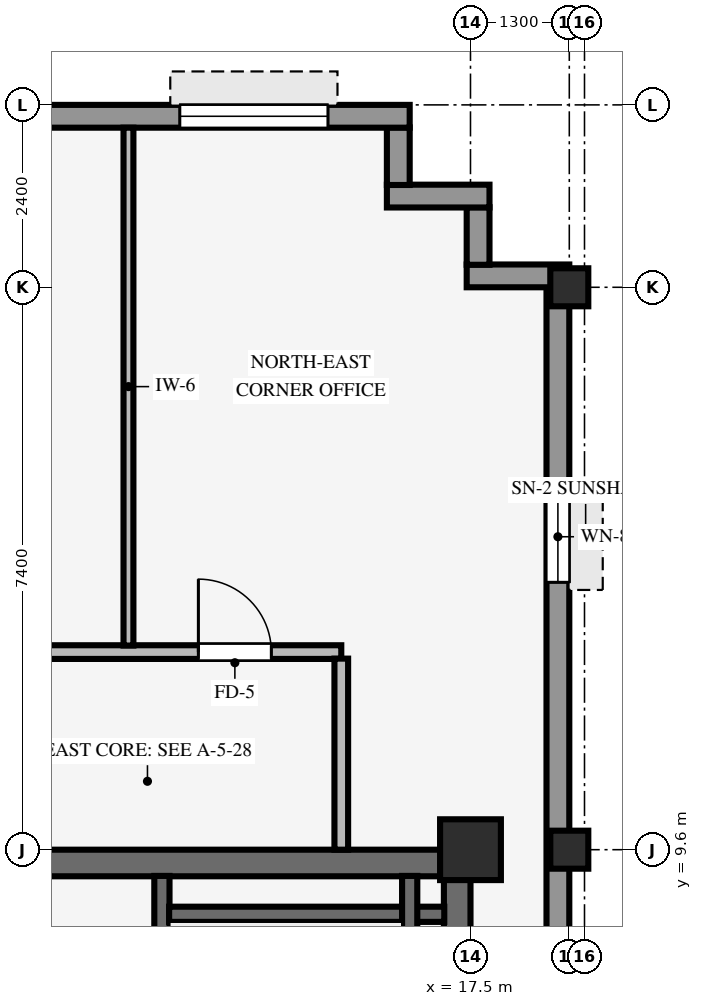
"""IFC4 building model, lengths in metres.
Left out: names, types, materials, properties, quantities, classifications, styles, units other than length and angle.
Written with IfcOpenShell. Run it as: python <this file> out.ifc"""

import sys

from ifc_helpers import new_model, si_unit, direction, frame, frame_2d, origin, origin_2d, place, context, subcontext, project, spatial, rectangle, hollow_rectangle, extrude, source, transform, mapped, element, fill, save


model = new_model("IFC4")
c1 = context("Model", 3, precision=1e-05, world=origin(), true_north=direction((0.0, 1.0)))
c2 = subcontext(c1, "Body", "Model", "MODEL_VIEW")
j1 = project(units=[si_unit("LENGTHUNIT", "METRE"), si_unit("PLANEANGLEUNIT", "RADIAN")], contexts=[c1])
p1 = place(None, origin())
s1 = spatial("IfcSite", under=j1, at=p1, CompositionType="ELEMENT")
p2 = place(p1, origin())
s2 = spatial("IfcBuilding", under=s1, at=p2, CompositionType="ELEMENT")
p3 = place(p2, frame((0.0, 0.0, 257.95)))
s3 = spatial("IfcBuildingStorey", under=s2, at=p3, CompositionType="ELEMENT", Elevation=257.95)
p4 = place(p3, frame((9.0, 9.425, 0.0), z_axis=(0.0, 0.0, 1.0), x_axis=(1.0, 0.0, 0.0)))
e1 = element("IfcWall", 1, at=p4, inside=s3, PredefinedType="SHEAR", context=c2, shape_type="SweptSolid", body=[
    extrude(rectangle(XDim=8.5, YDim=0.35, at=frame_2d((4.25, 0.0))), origin(), (0.0, 0.0, 1.0), 3.37),
])
p5 = place(p3, frame((17.325, -9.255, 0.0), z_axis=(0.0, 0.0, 1.0), x_axis=(0.0, 1.0, 0.0)))
e2 = element("IfcWall", 2, at=p5, inside=s3, PredefinedType="SHEAR", context=c2, shape_type="SweptSolid", body=[
    extrude(rectangle(XDim=18.51, YDim=0.35, at=frame_2d((9.255, 0.0))), origin(), (0.0, 0.0, 1.0), 3.37),
])
p6 = place(p3, frame((17.5, 9.6, 0.0), z_axis=(0.0, 0.0, 1.0), x_axis=(1.0, 0.0, 0.0)))
e3 = element("IfcColumn", 3, at=p6, inside=s3, PredefinedType="COLUMN", context=c2, shape_type="SweptSolid", body=[
    extrude(rectangle(XDim=0.8, YDim=0.8, at=origin_2d()), origin(), (0.0, 0.0, 1.0), 3.37),
])
for number, where, z_axis, x_axis in (
    (4, (18.8, 9.6, 0.0), (0.0, 0.0, 1.0), (1.0, 0.0, 0.0)),
    (5, (18.8, 17.0, 0.0), (0.0, 0.0, 1.0), (1.0, 0.0, 0.0)),
):
    element("IfcColumn", number, at=place(p3, frame(where, z_axis=z_axis, x_axis=x_axis)), inside=s3, PredefinedType="COLUMN", context=c2, shape_type="SweptSolid", body=[
        extrude(hollow_rectangle(XDim=0.5, YDim=0.5, WallThickness=0.032, InnerFilletRadius=0.032, OuterFilletRadius=0.064, at=origin_2d()), origin(), (0.0, 0.0, 1.0), 3.37),
    ])
p7 = place(p3, frame((18.65, -17.004, 0.0), z_axis=(0.0, 0.0, 1.0), x_axis=(0.0, 1.0, 0.0)))
e6 = element("IfcWall", 6, at=p7, inside=s3, PredefinedType="STANDARD", context=c2, shape_type="SweptSolid", body=[
    extrude(rectangle(XDim=34.008, YDim=0.3, at=frame_2d((17.004, 0.0))), origin(), (0.0, 0.0, 1.0), 2.705),
])
p8 = place(p7, frame((2.686, 0.0, 0.8)))
e7 = element("IfcOpeningElement", 7, at=p8, cuts=e6, PredefinedType="OPENING", context=c2, shape_type="SweptSolid", body=[
    extrude(rectangle(XDim=1.2, YDim=1.48, at=frame_2d((0.6, 0.74))), frame((0.0, 0.16, 0.0), z_axis=(0.0, -1.0, 0.0), x_axis=(1.0, 0.0, 0.0)), (0.0, 0.0, 1.0), 0.32),
])
p9 = place(p7, frame((30.122, 0.0, 0.8)))
e8 = element("IfcOpeningElement", 8, at=p9, cuts=e6, PredefinedType="OPENING", context=c2, shape_type="SweptSolid", body=[
    extrude(rectangle(XDim=1.2, YDim=1.48, at=frame_2d((0.6, 0.74))), frame((0.0, 0.16, 0.0), z_axis=(0.0, -1.0, 0.0), x_axis=(1.0, 0.0, 0.0)), (0.0, 0.0, 1.0), 0.32),
])
p10 = place(p3, frame((17.45, 17.15, 0.0), z_axis=(0.0, 0.0, 1.0), x_axis=(1.0, 0.0, 0.0)))
e9 = element("IfcWall", 9, at=p10, inside=s3, PredefinedType="STANDARD", context=c2, shape_type="SweptSolid", body=[
    extrude(rectangle(XDim=1.35, YDim=0.3, at=frame_2d((0.675, 0.0))), origin(), (0.0, 0.0, 1.0), 2.892),
])
p11 = place(p3, frame((17.6, 17.296, 0.0), z_axis=(0.0, 0.0, 1.0), x_axis=(0.0, 1.0, 0.0)))
e10 = element("IfcWall", 10, at=p11, inside=s3, PredefinedType="STANDARD", context=c2, shape_type="SweptSolid", body=[
    extrude(rectangle(XDim=0.758, YDim=0.3, at=frame_2d((0.379, 0.0))), origin(), (0.0, 0.0, 1.0), 2.892),
])
p12 = place(p3, frame((16.4, 18.2, 0.0), z_axis=(0.0, 0.0, 1.0), x_axis=(1.0, 0.0, 0.0)))
e11 = element("IfcWall", 11, at=p12, inside=s3, PredefinedType="STANDARD", context=c2, shape_type="SweptSolid", body=[
    extrude(rectangle(XDim=1.35, YDim=0.3, at=frame_2d((0.675, 0.0))), origin(), (0.0, 0.0, 1.0), 2.892),
])
p13 = place(p3, frame((16.55, 18.346, 0.0), z_axis=(0.0, 0.0, 1.0), x_axis=(0.0, 1.0, 0.0)))
e12 = element("IfcWall", 12, at=p13, inside=s3, PredefinedType="STANDARD", context=c2, shape_type="SweptSolid", body=[
    extrude(rectangle(XDim=0.758, YDim=0.3, at=frame_2d((0.379, 0.0))), origin(), (0.0, 0.0, 1.0), 2.892),
])
p14 = place(p3, frame((-18.9, 19.25, 0.0), z_axis=(0.0, 0.0, 1.0), x_axis=(1.0, 0.0, 0.0)))
e13 = element("IfcWall", 13, at=p14, inside=s3, PredefinedType="STANDARD", context=c2, shape_type="SweptSolid", body=[
    extrude(rectangle(XDim=35.6, YDim=0.3, at=frame_2d((17.8, 0.0))), origin(), (0.0, 0.0, 1.0), 2.705),
])
p15 = place(p14, frame((13.6, 0.0, 0.0)))
e14 = element("IfcOpeningElement", 14, at=p15, cuts=e13, PredefinedType="OPENING", context=c2, shape_type="SweptSolid", body=[
    extrude(rectangle(XDim=0.98, YDim=2.15, at=frame_2d((0.49, 1.075))), frame((0.0, 0.16, 0.0), z_axis=(0.0, -1.0, 0.0), x_axis=(1.0, 0.0, 0.0)), (0.0, 0.0, 1.0), 0.32),
])
p16 = place(p14, frame((2.425, 0.0, 0.8)))
e15 = element("IfcOpeningElement", 15, at=p16, cuts=e13, PredefinedType="OPENING", context=c2, shape_type="SweptSolid", body=[
    extrude(rectangle(XDim=1.95, YDim=1.48, at=frame_2d((0.975, 0.74))), frame((0.0, 0.16, 0.0), z_axis=(0.0, -1.0, 0.0), x_axis=(1.0, 0.0, 0.0)), (0.0, 0.0, 1.0), 0.32),
])
p17 = place(p14, frame((7.225, 0.0, 0.8)))
e16 = element("IfcOpeningElement", 16, at=p17, cuts=e13, PredefinedType="OPENING", context=c2, shape_type="SweptSolid", body=[
    extrude(rectangle(XDim=1.95, YDim=1.48, at=frame_2d((0.975, 0.74))), frame((0.0, 0.16, 0.0), z_axis=(0.0, -1.0, 0.0), x_axis=(1.0, 0.0, 0.0)), (0.0, 0.0, 1.0), 0.32),
])
p18 = place(p14, frame((15.475, 0.0, 0.8)))
e17 = element("IfcOpeningElement", 17, at=p18, cuts=e13, PredefinedType="OPENING", context=c2, shape_type="SweptSolid", body=[
    extrude(rectangle(XDim=1.95, YDim=1.48, at=frame_2d((0.975, 0.74))), frame((0.0, 0.16, 0.0), z_axis=(0.0, -1.0, 0.0), x_axis=(1.0, 0.0, 0.0)), (0.0, 0.0, 1.0), 0.32),
])
p19 = place(p14, frame((21.625, 0.0, 0.8)))
e18 = element("IfcOpeningElement", 18, at=p19, cuts=e13, PredefinedType="OPENING", context=c2, shape_type="SweptSolid", body=[
    extrude(rectangle(XDim=1.95, YDim=1.48, at=frame_2d((0.975, 0.74))), frame((0.0, 0.16, 0.0), z_axis=(0.0, -1.0, 0.0), x_axis=(1.0, 0.0, 0.0)), (0.0, 0.0, 1.0), 0.32),
])
p20 = place(p14, frame((32.575, 0.0, 0.8)))
e19 = element("IfcOpeningElement", 19, at=p20, cuts=e13, PredefinedType="OPENING", context=c2, shape_type="SweptSolid", body=[
    extrude(rectangle(XDim=1.95, YDim=1.48, at=frame_2d((0.975, 0.74))), frame((0.0, 0.16, 0.0), z_axis=(0.0, -1.0, 0.0), x_axis=(1.0, 0.0, 0.0)), (0.0, 0.0, 1.0), 0.32),
])
p21 = place(p3, frame((13.44, 0.9, 0.0), z_axis=(0.0, 0.0, 1.0), x_axis=(0.0, 1.0, 0.0)))
e20 = element("IfcWall", 20, at=p21, inside=s3, PredefinedType="SHEAR", context=c2, shape_type="SweptSolid", body=[
    extrude(rectangle(XDim=8.355, YDim=0.2, at=frame_2d((4.177, 0.0))), origin(), (0.0, 0.0, 1.0), 3.37),
])
p22 = place(p21, frame((0.43, 0.0, 0.0)))
e21 = element("IfcOpeningElement", 21, at=p22, cuts=e20, PredefinedType="OPENING", context=c2, shape_type="SweptSolid", body=[
    extrude(rectangle(XDim=1.1, YDim=2.15, at=frame_2d((0.55, 1.075))), frame((0.0, 0.11, 0.0), z_axis=(0.0, -1.0, 0.0), x_axis=(1.0, 0.0, 0.0)), (0.0, 0.0, 1.0), 0.22),
])
p23 = place(p3, frame((13.535, 8.75, 0.0), z_axis=(0.0, 0.0, 1.0), x_axis=(1.0, 0.0, 0.0)))
e22 = element("IfcWall", 22, at=p23, inside=s3, PredefinedType="SHEAR", context=c2, shape_type="SweptSolid", body=[
    extrude(rectangle(XDim=3.62, YDim=0.2, at=frame_2d((1.81, 0.0))), origin(), (0.0, 0.0, 1.0), 3.37),
])
p24 = place(p3, frame((16.7, 1.095, 0.0), z_axis=(0.0, 0.0, 1.0), x_axis=(0.0, 1.0, 0.0)))
e23 = element("IfcWall", 23, at=p24, inside=s3, PredefinedType="SHEAR", context=c2, shape_type="SweptSolid", body=[
    extrude(rectangle(XDim=8.16, YDim=0.2, at=frame_2d((4.08, 0.0))), origin(), (0.0, 0.0, 1.0), 3.37),
])
p25 = place(p3, frame((-9.0, 12.2, 0.0), z_axis=(0.0, 0.0, 1.0), x_axis=(1.0, 0.0, 0.0)))
e24 = element("IfcWall", 24, at=p25, inside=s3, PredefinedType="PARTITIONING", context=c2, shape_type="SweptSolid", body=[
    extrude(rectangle(XDim=24.8, YDim=0.18, at=frame_2d((12.4, 0.0))), origin(), (0.0, 0.0, 1.0), 3.36),
])
p26 = place(p25, frame((11.42, 0.0, 0.0)))
e25 = element("IfcOpeningElement", 25, at=p26, cuts=e24, PredefinedType="OPENING", context=c2, shape_type="SweptSolid", body=[
    extrude(rectangle(XDim=0.96, YDim=2.1, at=frame_2d((0.48, 1.05))), frame((0.0, 0.1, 0.0), z_axis=(0.0, -1.0, 0.0), x_axis=(1.0, 0.0, 0.0)), (0.0, 0.0, 1.0), 0.2),
])
p27 = place(p25, frame((4.82, 0.0, 0.0)))
e26 = element("IfcOpeningElement", 26, at=p27, cuts=e24, PredefinedType="OPENING", context=c2, shape_type="SweptSolid", body=[
    extrude(rectangle(XDim=0.96, YDim=2.1, at=frame_2d((0.48, 1.05))), frame((0.0, 0.1, 0.0), z_axis=(0.0, -1.0, 0.0), x_axis=(1.0, 0.0, 0.0)), (0.0, 0.0, 1.0), 0.2),
])
p28 = place(p25, frame((19.52, 0.0, 0.0)))
e27 = element("IfcOpeningElement", 27, at=p28, cuts=e24, PredefinedType="OPENING", context=c2, shape_type="SweptSolid", body=[
    extrude(rectangle(XDim=0.96, YDim=2.1, at=frame_2d((0.48, 1.05))), frame((0.0, 0.1, 0.0), z_axis=(0.0, -1.0, 0.0), x_axis=(1.0, 0.0, 0.0)), (0.0, 0.0, 1.0), 0.2),
])
p29 = place(p25, frame((22.92, 0.0, 0.0)))
e28 = element("IfcOpeningElement", 28, at=p29, cuts=e24, PredefinedType="OPENING", context=c2, shape_type="SweptSolid", body=[
    extrude(rectangle(XDim=0.96, YDim=2.1, at=frame_2d((0.48, 1.05))), frame((0.0, 0.1, 0.0), z_axis=(0.0, -1.0, 0.0), x_axis=(1.0, 0.0, 0.0)), (0.0, 0.0, 1.0), 0.2),
])
p30 = place(p25, frame((0.75, 0.0, 0.0)))
e29 = element("IfcOpeningElement", 29, at=p30, cuts=e24, PredefinedType="OPENING", context=c2, shape_type="SweptSolid", body=[
    extrude(rectangle(XDim=0.9, YDim=2.1, at=frame_2d((0.45, 1.05))), frame((0.0, 0.1, 0.0), z_axis=(0.0, -1.0, 0.0), x_axis=(1.0, 0.0, 0.0)), (0.0, 0.0, 1.0), 0.2),
])
p31 = place(p3, frame((13.0, 12.286, 0.0), z_axis=(0.0, 0.0, 1.0), x_axis=(0.0, 1.0, 0.0)))
e30 = element("IfcWall", 30, at=p31, inside=s3, PredefinedType="PARTITIONING", context=c2, shape_type="SweptSolid", body=[
    extrude(rectangle(XDim=6.814, YDim=0.13, at=frame_2d((3.407, 0.0))), origin(), (0.0, 0.0, 1.0), 3.36),
])
p32 = place(p3, frame((15.8, 9.6, 0.0), z_axis=(0.0, 0.0, 1.0), x_axis=(0.0, 1.0, 0.0)))
e31 = element("IfcWall", 31, at=p32, inside=s3, PredefinedType="PARTITIONING", context=c2, shape_type="SweptSolid", body=[
    extrude(rectangle(XDim=2.514, YDim=0.18, at=frame_2d((1.257, 0.0))), origin(), (0.0, 0.0, 1.0), 3.36),
])
m1 = source(origin(), c2, "Body", "SweptSolid", [
    extrude(rectangle(XDim=1.2, YDim=1.48, at=frame_2d((0.6, 0.74))), frame((0.0, 0.03, 0.0), z_axis=(0.0, -1.0, 0.0), x_axis=(1.0, 0.0, 0.0)), (0.0, 0.0, 1.0), 0.06),
])
p33 = place(p9, origin())
e32 = element("IfcWindow", 32, at=p33, inside=s3, PartitioningType="SINGLE_PANEL", PredefinedType="WINDOW", context=c2, shape_type="MappedRepresentation", body=[
    mapped(m1, transform((0.0, 0.0, 0.0), scale=1.0)),
])
fill(e8, e32)
m2 = source(origin(), c2, "Body", "SweptSolid", [
    extrude(rectangle(XDim=1.95, YDim=1.48, at=frame_2d((0.975, 0.74))), frame((0.0, 0.03, 0.0), z_axis=(0.0, -1.0, 0.0), x_axis=(1.0, 0.0, 0.0)), (0.0, 0.0, 1.0), 0.06),
])
p34 = place(p20, origin())
e33 = element("IfcWindow", 33, at=p34, inside=s3, PartitioningType="SINGLE_PANEL", PredefinedType="WINDOW", context=c2, shape_type="MappedRepresentation", body=[
    mapped(m2, transform((0.0, 0.0, 0.0), scale=1.0)),
])
fill(e19, e33)
m3 = source(origin(), c2, "Body", "SweptSolid", [
    extrude(rectangle(XDim=0.96, YDim=2.1, at=frame_2d((0.48, 1.05))), frame((0.0, 0.025, 0.0), z_axis=(0.0, -1.0, 0.0), x_axis=(1.0, 0.0, 0.0)), (0.0, 0.0, 1.0), 0.05),
])
p35 = place(p29, origin())
e34 = element("IfcDoor", 34, at=p35, inside=s3, OperationType="SINGLE_SWING_LEFT", PredefinedType="DOOR", context=c2, shape_type="MappedRepresentation", body=[
    mapped(m3, transform((0.0, 0.0, 0.0), scale=1.0)),
])
fill(e28, e34)
save(model, sys.argv[1])
